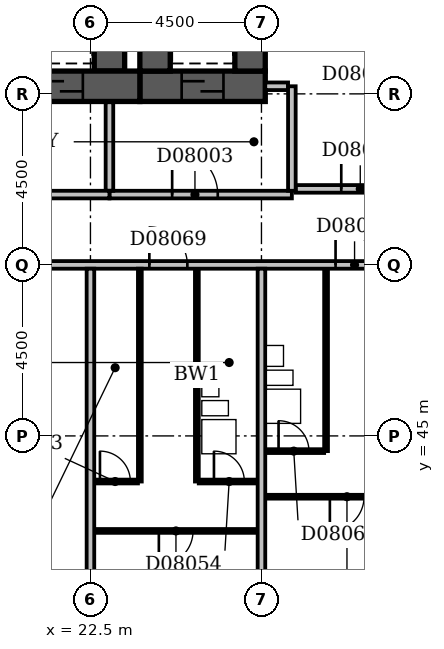
"""IFC4 building model, lengths in metres.
Left out: names, types, materials, properties, quantities, classifications, styles, units other than length and angle.
Written with IfcOpenShell. Run it as: python <this file> out.ifc"""

import sys

from ifc_helpers import new_model, si_unit, direction, frame, frame_2d, origin, place, context, subcontext, project, spatial, rectangle, extrude, element, fill, save


model = new_model("IFC4")
c1 = context("Model", 3, precision=1e-05, world=origin(), true_north=direction((0.0, 1.0)))
c2 = subcontext(c1, "Body", "Model", "MODEL_VIEW")
j1 = project(units=[si_unit("LENGTHUNIT", "METRE"), si_unit("PLANEANGLEUNIT", "RADIAN")], contexts=[c1])
p1 = place(None, origin())
s1 = spatial("IfcSite", under=j1, at=p1, CompositionType="ELEMENT")
p2 = place(p1, origin())
s2 = spatial("IfcBuilding", under=s1, at=p2, CompositionType="ELEMENT")
p3 = place(p2, frame((0.0, 0.0, 39.8)))
s3 = spatial("IfcBuildingStorey", under=s2, at=p3, CompositionType="ELEMENT", Elevation=39.8)
p4 = place(p3, frame((7.35, 54.2, -0.3), z_axis=(0.0, 0.0, 1.0), x_axis=(1.0, 0.0, 0.0)))
e1 = element("IfcWall", 1, at=p4, inside=s3, PredefinedType="SHEAR", context=c2, shape_type="SweptSolid", body=[
    extrude(rectangle(XDim=16.45, YDim=0.8, at=frame_2d((8.225, 0.0))), origin(), (0.0, 0.0, 1.0), 3.6),
])
p5 = place(p4, frame((1.35, 0.0, 0.3)))
e2 = element("IfcOpeningElement", 2, at=p5, cuts=e1, PredefinedType="OPENING", context=c2, shape_type="SweptSolid", body=[
    extrude(rectangle(XDim=1.1, YDim=2.1, at=frame_2d((0.55, 1.05))), frame((0.0, 0.412, 0.0), z_axis=(0.0, -1.0, 0.0), x_axis=(1.0, 0.0, 0.0)), (0.0, 0.0, 1.0), 0.824),
])
p6 = place(p4, frame((3.85, 0.0, 0.3)))
e3 = element("IfcOpeningElement", 3, at=p6, cuts=e1, PredefinedType="OPENING", context=c2, shape_type="SweptSolid", body=[
    extrude(rectangle(XDim=1.1, YDim=2.1, at=frame_2d((0.55, 1.05))), frame((0.0, 0.412, 0.0), z_axis=(0.0, -1.0, 0.0), x_axis=(1.0, 0.0, 0.0)), (0.0, 0.0, 1.0), 0.824),
])
p7 = place(p4, frame((6.35, 0.0, 0.3)))
e4 = element("IfcOpeningElement", 4, at=p7, cuts=e1, PredefinedType="OPENING", context=c2, shape_type="SweptSolid", body=[
    extrude(rectangle(XDim=1.1, YDim=2.1, at=frame_2d((0.55, 1.05))), frame((0.0, 0.412, 0.0), z_axis=(0.0, -1.0, 0.0), x_axis=(1.0, 0.0, 0.0)), (0.0, 0.0, 1.0), 0.824),
])
p8 = place(p4, frame((8.85, 0.0, 0.3)))
e5 = element("IfcOpeningElement", 5, at=p8, cuts=e1, PredefinedType="OPENING", context=c2, shape_type="SweptSolid", body=[
    extrude(rectangle(XDim=1.1, YDim=2.1, at=frame_2d((0.55, 1.05))), frame((0.0, 0.412, 0.0), z_axis=(0.0, -1.0, 0.0), x_axis=(1.0, 0.0, 0.0)), (0.0, 0.0, 1.0), 0.824),
])
p9 = place(p4, frame((11.35, 0.0, 0.3)))
e6 = element("IfcOpeningElement", 6, at=p9, cuts=e1, PredefinedType="OPENING", context=c2, shape_type="SweptSolid", body=[
    extrude(rectangle(XDim=1.1, YDim=2.1, at=frame_2d((0.55, 1.05))), frame((0.0, 0.412, 0.0), z_axis=(0.0, -1.0, 0.0), x_axis=(1.0, 0.0, 0.0)), (0.0, 0.0, 1.0), 0.824),
])
p10 = place(p4, frame((13.85, 0.0, 0.3)))
e7 = element("IfcOpeningElement", 7, at=p10, cuts=e1, PredefinedType="OPENING", context=c2, shape_type="SweptSolid", body=[
    extrude(rectangle(XDim=1.1, YDim=2.1, at=frame_2d((0.55, 1.05))), frame((0.0, 0.412, 0.0), z_axis=(0.0, -1.0, 0.0), x_axis=(1.0, 0.0, 0.0)), (0.0, 0.0, 1.0), 0.824),
])
p11 = place(p3, frame((23.0, 54.6, -0.3), z_axis=(0.0, 0.0, 1.0), x_axis=(0.0, 1.0, 0.0)))
e8 = element("IfcWall", 8, at=p11, inside=s3, PredefinedType="SHEAR", context=c2, shape_type="SweptSolid", body=[
    extrude(rectangle(XDim=3.0, YDim=0.8, at=frame_2d((1.5, 0.0))), origin(), (0.0, 0.0, 1.0), 3.6),
])
p12 = place(p3, frame((23.8, 54.2, -0.3), z_axis=(0.0, 0.0, 1.0), x_axis=(1.0, 0.0, 0.0)))
e9 = element("IfcWall", 9, at=p12, inside=s3, PredefinedType="SHEAR", context=c2, shape_type="SweptSolid", body=[
    extrude(rectangle(XDim=3.3, YDim=0.8, at=frame_2d((1.65, 0.0))), origin(), (0.0, 0.0, 1.0), 3.6),
])
p13 = place(p12, frame((1.1, 0.0, 0.3)))
e10 = element("IfcOpeningElement", 10, at=p13, cuts=e9, PredefinedType="OPENING", context=c2, shape_type="SweptSolid", body=[
    extrude(rectangle(XDim=1.1, YDim=2.1, at=frame_2d((0.55, 1.05))), frame((0.0, 0.412, 0.0), z_axis=(0.0, -1.0, 0.0), x_axis=(1.0, 0.0, 0.0)), (0.0, 0.0, 1.0), 0.824),
])
for number, where, z_axis, x_axis in (
    (11, (24.2, 54.6, -0.3), (0.0, 0.0, 1.0), (0.0, 1.0, 0.0)),
    (12, (26.7, 54.6, -0.3), (0.0, 0.0, 1.0), (0.0, 1.0, 0.0)),
):
    element("IfcWall", number, at=place(p3, frame(where, z_axis=z_axis, x_axis=x_axis)), inside=s3, PredefinedType="SHEAR", context=c2, shape_type="SweptSolid", body=[
        extrude(rectangle(XDim=3.0, YDim=0.8, at=frame_2d((1.5, 0.0))), origin(), (0.0, 0.0, 1.0), 3.6),
    ])
p14 = place(p3, frame((8.0, 51.35, 0.0), z_axis=(0.0, 0.0, 1.0), x_axis=(1.0, 0.0, 0.0)))
e13 = element("IfcWall", 13, at=p14, inside=s3, PredefinedType="PARTITIONING", context=c2, shape_type="SweptSolid", body=[
    extrude(rectangle(XDim=15.0, YDim=0.2, at=frame_2d((7.5, 0.0))), origin(), (0.0, 0.0, 1.0), 3.3),
])
p15 = place(p14, frame((3.4, 0.0, 0.0)))
e14 = element("IfcOpeningElement", 14, at=p15, cuts=e13, PredefinedType="OPENING", context=c2, shape_type="SweptSolid", body=[
    extrude(rectangle(XDim=1.2, YDim=2.1, at=frame_2d((0.6, 1.05))), frame((0.0, 0.112, 0.0), z_axis=(0.0, -1.0, 0.0), x_axis=(1.0, 0.0, 0.0)), (0.0, 0.0, 1.0), 0.224),
])
p16 = place(p14, frame((9.4, 0.0, 0.0)))
e15 = element("IfcOpeningElement", 15, at=p16, cuts=e13, PredefinedType="OPENING", context=c2, shape_type="SweptSolid", body=[
    extrude(rectangle(XDim=1.2, YDim=2.1, at=frame_2d((0.6, 1.05))), frame((0.0, 0.112, 0.0), z_axis=(0.0, -1.0, 0.0), x_axis=(1.0, 0.0, 0.0)), (0.0, 0.0, 1.0), 0.224),
])
p17 = place(p3, frame((23.0, 51.45, 0.0), z_axis=(0.0, 0.0, 1.0), x_axis=(0.0, 1.0, 0.0)))
e16 = element("IfcWall", 16, at=p17, inside=s3, PredefinedType="PARTITIONING", context=c2, shape_type="SweptSolid", body=[
    extrude(rectangle(XDim=2.33, YDim=0.2, at=frame_2d((1.165, 0.0))), origin(), (0.0, 0.0, 1.0), 3.3),
])
p18 = place(p3, frame((23.0, 51.35, 0.0), z_axis=(0.0, 0.0, 1.0), x_axis=(1.0, 0.0, 0.0)))
e17 = element("IfcWall", 17, at=p18, inside=s3, PredefinedType="PARTITIONING", context=c2, shape_type="SweptSolid", body=[
    extrude(rectangle(XDim=4.8, YDim=0.2, at=frame_2d((2.4, 0.0))), origin(), (0.0, 0.0, 1.0), 3.3),
])
p19 = place(p18, frame((1.65, 0.0, 0.0)))
e18 = element("IfcOpeningElement", 18, at=p19, cuts=e17, PredefinedType="OPENING", context=c2, shape_type="SweptSolid", body=[
    extrude(rectangle(XDim=1.2, YDim=2.1, at=frame_2d((0.6, 1.05))), frame((0.0, 0.112, 0.0), z_axis=(0.0, -1.0, 0.0), x_axis=(1.0, 0.0, 0.0)), (0.0, 0.0, 1.0), 0.224),
])
p20 = place(p3, frame((27.8, 51.45, 0.0), z_axis=(0.0, 0.0, 1.0), x_axis=(0.0, 1.0, 0.0)))
e19 = element("IfcWall", 19, at=p20, inside=s3, PredefinedType="PARTITIONING", context=c2, shape_type="SweptSolid", body=[
    extrude(rectangle(XDim=2.75, YDim=0.2, at=frame_2d((1.375, 0.0))), origin(), (0.0, 0.0, 1.0), 3.3),
])
p21 = place(p3, frame((27.1, 54.2, 0.0), z_axis=(0.0, 0.0, 1.0), x_axis=(1.0, 0.0, 0.0)))
e20 = element("IfcWall", 20, at=p21, inside=s3, PredefinedType="PARTITIONING", context=c2, shape_type="SweptSolid", body=[
    extrude(rectangle(XDim=0.6, YDim=0.2, at=frame_2d((0.3, 0.0))), origin(), (0.0, 0.0, 1.0), 3.3),
])
p22 = place(p3, frame((22.5, 36.6, 0.0), z_axis=(0.0, 0.0, 1.0), x_axis=(0.0, 1.0, 0.0)))
e21 = element("IfcWall", 21, at=p22, inside=s3, PredefinedType="PARTITIONING", context=c2, shape_type="SweptSolid", body=[
    extrude(rectangle(XDim=12.8, YDim=0.2, at=frame_2d((6.4, 0.0))), origin(), (0.0, 0.0, 1.0), 3.3),
])
p23 = place(p3, frame((27.0, 36.6, 0.0), z_axis=(0.0, 0.0, 1.0), x_axis=(0.0, 1.0, 0.0)))
e22 = element("IfcWall", 22, at=p23, inside=s3, PredefinedType="PARTITIONING", context=c2, shape_type="SweptSolid", body=[
    extrude(rectangle(XDim=12.8, YDim=0.2, at=frame_2d((6.4, 0.0))), origin(), (0.0, 0.0, 1.0), 2.6),
])
p24 = place(p3, frame((22.6, 42.5, 0.0), z_axis=(0.0, 0.0, 1.0), x_axis=(1.0, 0.0, 0.0)))
e23 = element("IfcWall", 23, at=p24, inside=s3, PredefinedType="PARTITIONING", context=c2, shape_type="SweptSolid", body=[
    extrude(rectangle(XDim=4.3, YDim=0.1, at=frame_2d((2.15, 0.0))), origin(), (0.0, 0.0, 1.0), 3.3),
])
p25 = place(p24, frame((1.7, 0.0, 0.0)))
e24 = element("IfcOpeningElement", 24, at=p25, cuts=e23, PredefinedType="OPENING", context=c2, shape_type="SweptSolid", body=[
    extrude(rectangle(XDim=0.9, YDim=2.1, at=frame_2d((0.45, 1.05))), frame((0.0, 0.062, 0.0), z_axis=(0.0, -1.0, 0.0), x_axis=(1.0, 0.0, 0.0)), (0.0, 0.0, 1.0), 0.124),
])
p26 = place(p3, frame((27.1, 43.4, 0.0), z_axis=(0.0, 0.0, 1.0), x_axis=(1.0, 0.0, 0.0)))
e25 = element("IfcWall", 25, at=p26, inside=s3, PredefinedType="PARTITIONING", context=c2, shape_type="SweptSolid", body=[
    extrude(rectangle(XDim=4.3, YDim=0.1, at=frame_2d((2.15, 0.0))), origin(), (0.0, 0.0, 1.0), 3.3),
])
p27 = place(p26, frame((1.7, 0.0, 0.0)))
e26 = element("IfcOpeningElement", 26, at=p27, cuts=e25, PredefinedType="OPENING", context=c2, shape_type="SweptSolid", body=[
    extrude(rectangle(XDim=0.9, YDim=2.1, at=frame_2d((0.45, 1.05))), frame((0.0, 0.062, 0.0), z_axis=(0.0, -1.0, 0.0), x_axis=(1.0, 0.0, 0.0)), (0.0, 0.0, 1.0), 0.124),
])
p28 = place(p3, frame((22.6, 43.8, 0.0), z_axis=(0.0, 0.0, 1.0), x_axis=(1.0, 0.0, 0.0)))
e27 = element("IfcWall", 27, at=p28, inside=s3, PredefinedType="PARTITIONING", context=c2, shape_type="SweptSolid", body=[
    extrude(rectangle(XDim=1.15, YDim=0.1, at=frame_2d((0.575, 0.0))), origin(), (0.0, 0.0, 1.0), 3.3),
])
p29 = place(p28, frame((0.15, 0.0, 0.0)))
e28 = element("IfcOpeningElement", 28, at=p29, cuts=e27, PredefinedType="OPENING", context=c2, shape_type="SweptSolid", body=[
    extrude(rectangle(XDim=0.8, YDim=2.1, at=frame_2d((0.4, 1.05))), frame((0.0, 0.062, 0.0), z_axis=(0.0, -1.0, 0.0), x_axis=(1.0, 0.0, 0.0)), (0.0, 0.0, 1.0), 0.124),
])
p30 = place(p3, frame((23.8, 43.8, 0.0), z_axis=(0.0, 0.0, 1.0), x_axis=(0.0, 1.0, 0.0)))
e29 = element("IfcWall", 29, at=p30, inside=s3, PredefinedType="PARTITIONING", context=c2, shape_type="SweptSolid", body=[
    extrude(rectangle(XDim=5.6, YDim=0.1, at=frame_2d((2.8, 0.0))), origin(), (0.0, 0.0, 1.0), 3.3),
])
p31 = place(p3, frame((25.3, 43.8, 0.0), z_axis=(0.0, 0.0, 1.0), x_axis=(0.0, 1.0, 0.0)))
e30 = element("IfcWall", 30, at=p31, inside=s3, PredefinedType="PLUMBINGWALL", context=c2, shape_type="SweptSolid", body=[
    extrude(rectangle(XDim=5.6, YDim=0.1, at=frame_2d((2.8, 0.0))), origin(), (0.0, 0.0, 1.0), 3.3),
])
p32 = place(p3, frame((25.35, 43.8, 0.0), z_axis=(0.0, 0.0, 1.0), x_axis=(1.0, 0.0, 0.0)))
e31 = element("IfcWall", 31, at=p32, inside=s3, PredefinedType="PARTITIONING", context=c2, shape_type="SweptSolid", body=[
    extrude(rectangle(XDim=1.55, YDim=0.1, at=frame_2d((0.775, 0.0))), origin(), (0.0, 0.0, 1.0), 3.3),
])
p33 = place(p32, frame((0.4, 0.0, 0.0)))
e32 = element("IfcOpeningElement", 32, at=p33, cuts=e31, PredefinedType="OPENING", context=c2, shape_type="SweptSolid", body=[
    extrude(rectangle(XDim=0.8, YDim=2.1, at=frame_2d((0.4, 1.05))), frame((0.0, 0.062, 0.0), z_axis=(0.0, -1.0, 0.0), x_axis=(1.0, 0.0, 0.0)), (0.0, 0.0, 1.0), 0.124),
])
p34 = place(p3, frame((27.1, 44.6, 0.0), z_axis=(0.0, 0.0, 1.0), x_axis=(1.0, 0.0, 0.0)))
e33 = element("IfcWall", 33, at=p34, inside=s3, PredefinedType="PARTITIONING", context=c2, shape_type="SweptSolid", body=[
    extrude(rectangle(XDim=1.55, YDim=0.1, at=frame_2d((0.775, 0.0))), origin(), (0.0, 0.0, 1.0), 3.3),
])
p35 = place(p34, frame((0.35, 0.0, 0.0)))
e34 = element("IfcOpeningElement", 34, at=p35, cuts=e33, PredefinedType="OPENING", context=c2, shape_type="SweptSolid", body=[
    extrude(rectangle(XDim=0.8, YDim=2.1, at=frame_2d((0.4, 1.05))), frame((0.0, 0.062, 0.0), z_axis=(0.0, -1.0, 0.0), x_axis=(1.0, 0.0, 0.0)), (0.0, 0.0, 1.0), 0.124),
])
p36 = place(p3, frame((28.7, 44.6, 0.0), z_axis=(0.0, 0.0, 1.0), x_axis=(0.0, 1.0, 0.0)))
e35 = element("IfcWall", 35, at=p36, inside=s3, PredefinedType="PLUMBINGWALL", context=c2, shape_type="SweptSolid", body=[
    extrude(rectangle(XDim=4.8, YDim=0.1, at=frame_2d((2.4, 0.0))), origin(), (0.0, 0.0, 1.0), 3.3),
])
p37 = place(p3, frame((9.1, 49.5, 0.0), z_axis=(0.0, 0.0, 1.0), x_axis=(1.0, 0.0, 0.0)))
e36 = element("IfcWall", 36, at=p37, inside=s3, PredefinedType="PARTITIONING", context=c2, shape_type="SweptSolid", body=[
    extrude(rectangle(XDim=57.8, YDim=0.2, at=frame_2d((28.9, 0.0))), origin(), (0.0, 0.0, 1.0), 3.3),
])
p38 = place(p37, frame((14.95, 0.0, 0.0)))
e37 = element("IfcOpeningElement", 37, at=p38, cuts=e36, PredefinedType="OPENING", context=c2, shape_type="SweptSolid", body=[
    extrude(rectangle(XDim=1.0, YDim=2.1, at=frame_2d((0.5, 1.05))), frame((0.0, 0.112, 0.0), z_axis=(0.0, -1.0, 0.0), x_axis=(1.0, 0.0, 0.0)), (0.0, 0.0, 1.0), 0.224),
])
p39 = place(p37, frame((19.85, 0.0, 0.0)))
e38 = element("IfcOpeningElement", 38, at=p39, cuts=e36, PredefinedType="OPENING", context=c2, shape_type="SweptSolid", body=[
    extrude(rectangle(XDim=1.0, YDim=2.1, at=frame_2d((0.5, 1.05))), frame((0.0, 0.112, 0.0), z_axis=(0.0, -1.0, 0.0), x_axis=(1.0, 0.0, 0.0)), (0.0, 0.0, 1.0), 0.224),
])
p40 = place(p37, frame((22.7, 0.0, 0.0)))
e39 = element("IfcOpeningElement", 39, at=p40, cuts=e36, PredefinedType="OPENING", context=c2, shape_type="SweptSolid", body=[
    extrude(rectangle(XDim=1.0, YDim=2.1, at=frame_2d((0.5, 1.05))), frame((0.0, 0.112, 0.0), z_axis=(0.0, -1.0, 0.0), x_axis=(1.0, 0.0, 0.0)), (0.0, 0.0, 1.0), 0.224),
])
p41 = place(p37, frame((33.35, 0.0, 0.0)))
e40 = element("IfcOpeningElement", 40, at=p41, cuts=e36, PredefinedType="OPENING", context=c2, shape_type="SweptSolid", body=[
    extrude(rectangle(XDim=1.0, YDim=2.1, at=frame_2d((0.5, 1.05))), frame((0.0, 0.112, 0.0), z_axis=(0.0, -1.0, 0.0), x_axis=(1.0, 0.0, 0.0)), (0.0, 0.0, 1.0), 0.224),
])
p42 = place(p37, frame((36.2, 0.0, 0.0)))
e41 = element("IfcOpeningElement", 41, at=p42, cuts=e36, PredefinedType="OPENING", context=c2, shape_type="SweptSolid", body=[
    extrude(rectangle(XDim=1.0, YDim=2.1, at=frame_2d((0.5, 1.05))), frame((0.0, 0.112, 0.0), z_axis=(0.0, -1.0, 0.0), x_axis=(1.0, 0.0, 0.0)), (0.0, 0.0, 1.0), 0.224),
])
p43 = place(p37, frame((54.15, 0.0, 0.0)))
e42 = element("IfcOpeningElement", 42, at=p43, cuts=e36, PredefinedType="OPENING", context=c2, shape_type="SweptSolid", body=[
    extrude(rectangle(XDim=1.0, YDim=2.1, at=frame_2d((0.5, 1.05))), frame((0.0, 0.112, 0.0), z_axis=(0.0, -1.0, 0.0), x_axis=(1.0, 0.0, 0.0)), (0.0, 0.0, 1.0), 0.224),
])
p44 = place(p37, frame((6.15, 0.0, 0.0)))
e43 = element("IfcOpeningElement", 43, at=p44, cuts=e36, PredefinedType="OPENING", context=c2, shape_type="SweptSolid", body=[
    extrude(rectangle(XDim=0.9, YDim=2.1, at=frame_2d((0.45, 1.05))), frame((0.0, 0.112, 0.0), z_axis=(0.0, -1.0, 0.0), x_axis=(1.0, 0.0, 0.0)), (0.0, 0.0, 1.0), 0.224),
])
p45 = place(p3, frame((27.9, 51.5, 0.0), z_axis=(0.0, 0.0, 1.0), x_axis=(1.0, 0.0, 0.0)))
e44 = element("IfcWall", 44, at=p45, inside=s3, PredefinedType="PARTITIONING", context=c2, shape_type="SweptSolid", body=[
    extrude(rectangle(XDim=9.3, YDim=0.2, at=frame_2d((4.65, 0.0))), origin(), (0.0, 0.0, 1.0), 3.3),
])
p46 = place(p45, frame((1.2, 0.0, 0.0)))
e45 = element("IfcOpeningElement", 45, at=p46, cuts=e44, PredefinedType="OPENING", context=c2, shape_type="SweptSolid", body=[
    extrude(rectangle(XDim=1.0, YDim=2.1, at=frame_2d((0.5, 1.05))), frame((0.0, 0.112, 0.0), z_axis=(0.0, -1.0, 0.0), x_axis=(1.0, 0.0, 0.0)), (0.0, 0.0, 1.0), 0.224),
])
p47 = place(p45, frame((6.0, 0.0, 0.0)))
e46 = element("IfcOpeningElement", 46, at=p47, cuts=e44, PredefinedType="OPENING", context=c2, shape_type="SweptSolid", body=[
    extrude(rectangle(XDim=0.9, YDim=2.1, at=frame_2d((0.45, 1.05))), frame((0.0, 0.112, 0.0), z_axis=(0.0, -1.0, 0.0), x_axis=(1.0, 0.0, 0.0)), (0.0, 0.0, 1.0), 0.224),
])
p48 = place(p19, origin())
e47 = element("IfcDoor", 47, at=p48, inside=s3, OperationType="SINGLE_SWING_LEFT", PredefinedType="DOOR", context=c2, shape_type="SweptSolid", body=[
    extrude(rectangle(XDim=1.2, YDim=2.1, at=frame_2d((0.6, 1.05))), frame((0.0, 0.025, 0.0), z_axis=(0.0, -1.0, 0.0), x_axis=(1.0, 0.0, 0.0)), (0.0, 0.0, 1.0), 0.05),
])
fill(e18, e47)
p49 = place(p13, origin())
e48 = element("IfcDoor", 48, at=p49, inside=s3, OperationType="SLIDING_TO_LEFT", PredefinedType="DOOR", context=c2, shape_type="SweptSolid", body=[
    extrude(rectangle(XDim=1.1, YDim=2.1, at=frame_2d((0.55, 1.05))), frame((0.0, 0.025, 0.0), z_axis=(0.0, -1.0, 0.0), x_axis=(1.0, 0.0, 0.0)), (0.0, 0.0, 1.0), 0.05),
])
fill(e10, e48)
p50 = place(p10, origin())
e49 = element("IfcDoor", 49, at=p50, inside=s3, OperationType="SLIDING_TO_LEFT", PredefinedType="DOOR", context=c2, shape_type="SweptSolid", body=[
    extrude(rectangle(XDim=1.1, YDim=2.1, at=frame_2d((0.55, 1.05))), frame((0.0, 0.025, 0.0), z_axis=(0.0, -1.0, 0.0), x_axis=(1.0, 0.0, 0.0)), (0.0, 0.0, 1.0), 0.05),
])
fill(e7, e49)
p51 = place(p25, frame((0.9, 0.0, 0.0), z_axis=(0.0, 0.0, 1.0), x_axis=(-1.0, 0.0, 0.0)))
e50 = element("IfcDoor", 50, at=p51, inside=s3, OperationType="SINGLE_SWING_RIGHT", PredefinedType="DOOR", context=c2, shape_type="SweptSolid", body=[
    extrude(rectangle(XDim=0.9, YDim=2.1, at=frame_2d((0.45, 1.05))), frame((0.0, 0.025, 0.0), z_axis=(0.0, -1.0, 0.0), x_axis=(1.0, 0.0, 0.0)), (0.0, 0.0, 1.0), 0.05),
])
fill(e24, e50)
p52 = place(p27, frame((0.9, 0.0, 0.0), z_axis=(0.0, 0.0, 1.0), x_axis=(-1.0, 0.0, 0.0)))
e51 = element("IfcDoor", 51, at=p52, inside=s3, OperationType="SINGLE_SWING_RIGHT", PredefinedType="DOOR", context=c2, shape_type="SweptSolid", body=[
    extrude(rectangle(XDim=0.9, YDim=2.1, at=frame_2d((0.45, 1.05))), frame((0.0, 0.025, 0.0), z_axis=(0.0, -1.0, 0.0), x_axis=(1.0, 0.0, 0.0)), (0.0, 0.0, 1.0), 0.05),
])
fill(e26, e51)
p53 = place(p29, origin())
e52 = element("IfcDoor", 52, at=p53, inside=s3, OperationType="SINGLE_SWING_LEFT", PredefinedType="DOOR", context=c2, shape_type="SweptSolid", body=[
    extrude(rectangle(XDim=0.8, YDim=2.1, at=frame_2d((0.4, 1.05))), frame((0.0, 0.025, 0.0), z_axis=(0.0, -1.0, 0.0), x_axis=(1.0, 0.0, 0.0)), (0.0, 0.0, 1.0), 0.05),
])
fill(e28, e52)
p54 = place(p33, origin())
e53 = element("IfcDoor", 53, at=p54, inside=s3, OperationType="SINGLE_SWING_LEFT", PredefinedType="DOOR", context=c2, shape_type="SweptSolid", body=[
    extrude(rectangle(XDim=0.8, YDim=2.1, at=frame_2d((0.4, 1.05))), frame((0.0, 0.025, 0.0), z_axis=(0.0, -1.0, 0.0), x_axis=(1.0, 0.0, 0.0)), (0.0, 0.0, 1.0), 0.05),
])
fill(e32, e53)
p55 = place(p35, origin())
e54 = element("IfcDoor", 54, at=p55, inside=s3, OperationType="SINGLE_SWING_LEFT", PredefinedType="DOOR", context=c2, shape_type="SweptSolid", body=[
    extrude(rectangle(XDim=0.8, YDim=2.1, at=frame_2d((0.4, 1.05))), frame((0.0, 0.025, 0.0), z_axis=(0.0, -1.0, 0.0), x_axis=(1.0, 0.0, 0.0)), (0.0, 0.0, 1.0), 0.05),
])
fill(e34, e54)
p56 = place(p38, origin())
e55 = element("IfcDoor", 55, at=p56, inside=s3, OperationType="SINGLE_SWING_LEFT", PredefinedType="DOOR", context=c2, shape_type="SweptSolid", body=[
    extrude(rectangle(XDim=1.0, YDim=2.1, at=frame_2d((0.5, 1.05))), frame((0.0, 0.025, 0.0), z_axis=(0.0, -1.0, 0.0), x_axis=(1.0, 0.0, 0.0)), (0.0, 0.0, 1.0), 0.05),
])
fill(e37, e55)
p57 = place(p39, origin())
e56 = element("IfcDoor", 56, at=p57, inside=s3, OperationType="SINGLE_SWING_LEFT", PredefinedType="DOOR", context=c2, shape_type="SweptSolid", body=[
    extrude(rectangle(XDim=1.0, YDim=2.1, at=frame_2d((0.5, 1.05))), frame((0.0, 0.025, 0.0), z_axis=(0.0, -1.0, 0.0), x_axis=(1.0, 0.0, 0.0)), (0.0, 0.0, 1.0), 0.05),
])
fill(e38, e56)
p58 = place(p46, origin())
e57 = element("IfcDoor", 57, at=p58, inside=s3, OperationType="SINGLE_SWING_LEFT", PredefinedType="DOOR", context=c2, shape_type="SweptSolid", body=[
    extrude(rectangle(XDim=1.0, YDim=2.1, at=frame_2d((0.5, 1.05))), frame((0.0, 0.025, 0.0), z_axis=(0.0, -1.0, 0.0), x_axis=(1.0, 0.0, 0.0)), (0.0, 0.0, 1.0), 0.05),
])
fill(e45, e57)
save(model, sys.argv[1])
